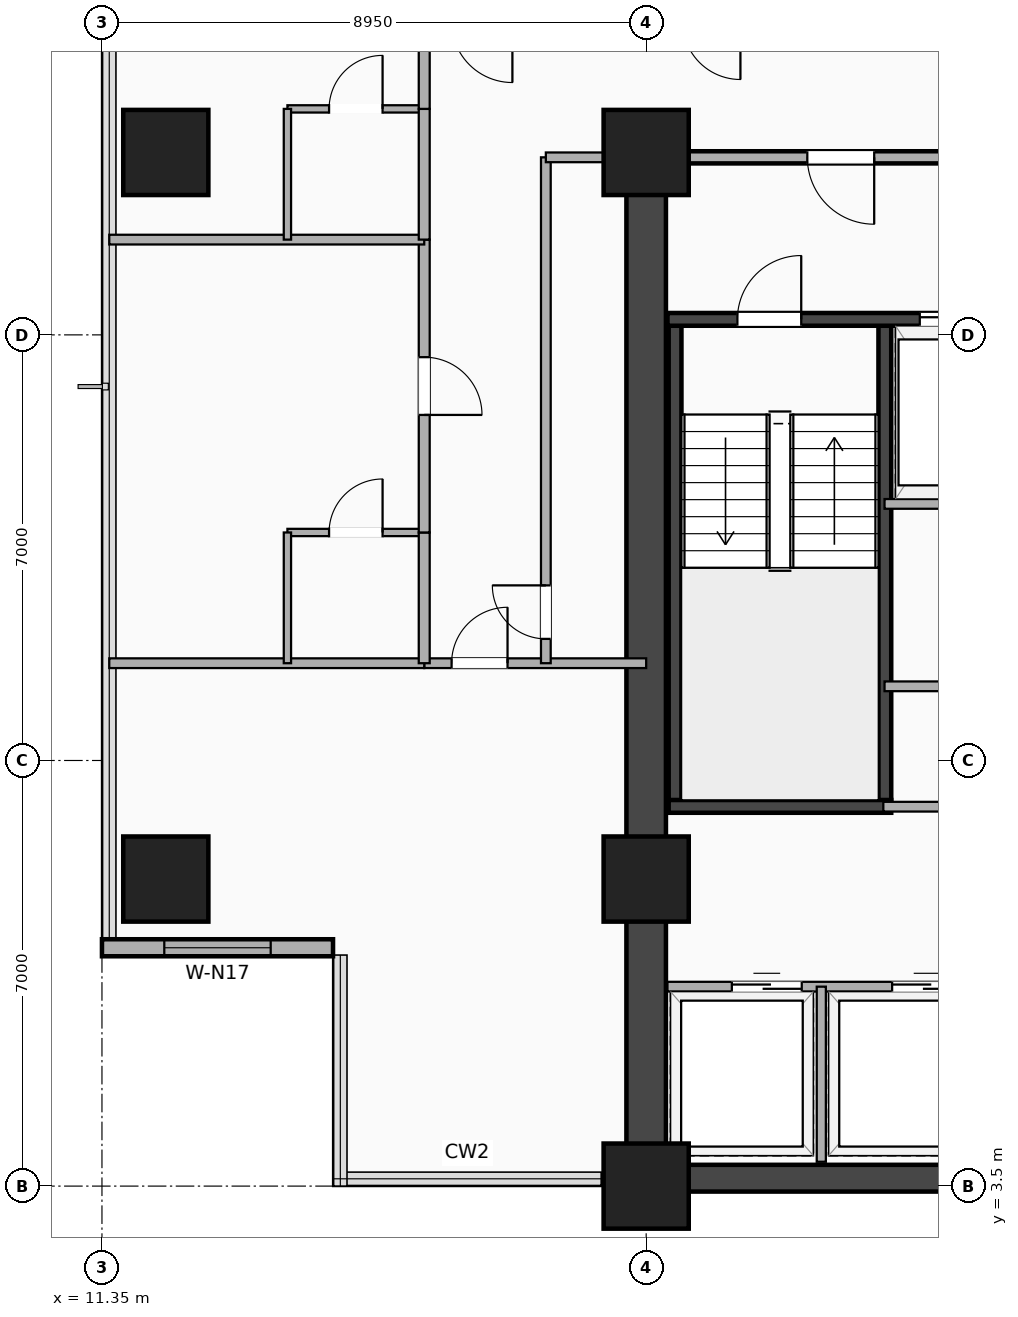
"""IFC4 building model, lengths in metres.
Left out: names, types, materials, properties, quantities, classifications, styles, units other than length and angle.
Written with IfcOpenShell. Run it as: python <this file> out.ifc"""

import sys

from ifc_helpers import new_model, si_unit, direction, frame, frame_2d, origin, origin_2d, place, context, subcontext, project, spatial, rectangle, extrude, element, fill, save


model = new_model("IFC4")
c1 = context("Model", 3, precision=1e-05, world=origin(), true_north=direction((0.0, 1.0)))
c2 = subcontext(c1, "Body", "Model", "MODEL_VIEW")
j1 = project(units=[si_unit("LENGTHUNIT", "METRE"), si_unit("PLANEANGLEUNIT", "RADIAN")], contexts=[c1])
p1 = place(None, origin())
s1 = spatial("IfcSite", under=j1, at=p1, CompositionType="ELEMENT")
p2 = place(p1, origin())
s2 = spatial("IfcBuilding", under=s1, at=p2, CompositionType="ELEMENT")
p3 = place(p2, frame((0.0, 0.0, 64.9)))
s3 = spatial("IfcBuildingStorey", under=s2, at=p3, CompositionType="ELEMENT", Elevation=64.9)
p4 = place(p3, frame((20.3, 3.63, 0.0), z_axis=(0.0, 0.0, 1.0), x_axis=(1.0, 0.0, 0.0)))
e1 = element("IfcWall", 1, at=p4, inside=s3, PredefinedType="SHEAR", context=c2, shape_type="SweptSolid", body=[
    extrude(rectangle(XDim=24.5, YDim=0.44, at=frame_2d((12.25, 0.0))), origin(), (0.0, 0.0, 1.0), 3.22),
])
p5 = place(p3, frame((20.3, 3.5, 0.0), z_axis=(0.0, 0.0, 1.0), x_axis=(0.0, 1.0, 0.0)))
e2 = element("IfcWall", 2, at=p5, inside=s3, PredefinedType="SHEAR", context=c2, shape_type="SweptSolid", body=[
    extrude(rectangle(XDim=16.9, YDim=0.65, at=frame_2d((8.45, 0.0))), origin(), (0.0, 0.0, 1.0), 3.22),
])
for number, where, z_axis, x_axis in (
    (3, (20.775, 9.745, 0.0), (0.0, 0.0, 1.0), (0.0, 1.0, 0.0)),
    (4, (24.225, 9.745, 0.0), (0.0, 0.0, 1.0), (0.0, 1.0, 0.0)),
):
    element("IfcWall", number, at=place(p3, frame(where, z_axis=z_axis, x_axis=x_axis)), inside=s3, PredefinedType="SHEAR", context=c2, shape_type="SweptSolid", body=[
        extrude(rectangle(XDim=8.01, YDim=0.21, at=frame_2d((4.005, 0.0))), origin(), (0.0, 0.0, 1.0), 3.22),
    ])
p6 = place(p3, frame((20.67, 9.745, 0.0), z_axis=(0.0, 0.0, 1.0), x_axis=(1.0, 0.0, 0.0)))
e5 = element("IfcWall", 5, at=p6, inside=s3, PredefinedType="SHEAR", context=c2, shape_type="SweptSolid", body=[
    extrude(rectangle(XDim=3.66, YDim=0.21, at=frame_2d((1.83, 0.0))), origin(), (0.0, 0.0, 1.0), 3.22),
])
p7 = place(p3, frame((20.65, 17.755, 0.0), z_axis=(0.0, 0.0, 1.0), x_axis=(1.0, 0.0, 0.0)))
e6 = element("IfcWall", 6, at=p7, inside=s3, PredefinedType="SHEAR", context=c2, shape_type="SweptSolid", body=[
    extrude(rectangle(XDim=8.3, YDim=0.21, at=frame_2d((4.15, 0.0))), origin(), (0.0, 0.0, 1.0), 3.22),
])
p8 = place(p7, frame((2.2, 0.0, 0.0), z_axis=(0.0, 0.0, 1.0), x_axis=(-1.0, 0.0, 0.0)))
e7 = element("IfcOpeningElement", 7, at=p8, cuts=e6, PredefinedType="OPENING", context=c2, shape_type="SweptSolid", body=[
    extrude(rectangle(XDim=1.05, YDim=2.15, at=frame_2d((0.525, 1.075))), frame((0.0, 0.115, 0.0), z_axis=(0.0, -1.0, 0.0), x_axis=(1.0, 0.0, 0.0)), (0.0, 0.0, 1.0), 0.23),
])
p9 = place(p7, frame((4.15, 0.0, 0.0)))
e8 = element("IfcOpeningElement", 8, at=p9, cuts=e6, PredefinedType="OPENING", context=c2, shape_type="SweptSolid", body=[
    extrude(rectangle(XDim=1.1, YDim=2.18, at=frame_2d((0.55, 1.09))), frame((0.0, 0.115, 0.0), z_axis=(0.0, -1.0, 0.0), x_axis=(1.0, 0.0, 0.0)), (0.0, 0.0, 1.0), 0.23),
])
p10 = place(p7, frame((6.45, 0.0, 0.0)))
e9 = element("IfcOpeningElement", 9, at=p10, cuts=e6, PredefinedType="OPENING", context=c2, shape_type="SweptSolid", body=[
    extrude(rectangle(XDim=1.12, YDim=2.2, at=frame_2d((0.56, 1.1))), frame((0.0, 0.115, 0.0), z_axis=(0.0, -1.0, 0.0), x_axis=(1.0, 0.0, 0.0)), (0.0, 0.0, 1.0), 0.23),
])
for number, where, z_axis, x_axis in (
    (10, (20.3, 3.5, -0.28), (0.0, 0.0, 1.0), (1.0, 0.0, 0.0)),
    (11, (20.3, 8.55, -0.28), (0.0, 0.0, 1.0), (1.0, 0.0, 0.0)),
    (12, (20.3, 20.5, -0.28), (0.0, 0.0, 1.0), (1.0, 0.0, 0.0)),
    (13, (12.4, 8.55, -0.28), (0.0, 0.0, 1.0), (1.0, 0.0, 0.0)),
    (14, (12.4, 20.5, -0.28), (0.0, 0.0, 1.0), (1.0, 0.0, 0.0)),
):
    element("IfcColumn", number, at=place(p3, frame(where, z_axis=z_axis, x_axis=x_axis)), inside=s3, PredefinedType="COLUMN", context=c2, shape_type="SweptSolid", body=[
        extrude(rectangle(XDim=1.4, YDim=1.4, at=origin_2d()), origin(), (0.0, 0.0, 1.0), 3.5),
    ])
p11 = place(p3, frame((11.35, 7.42, 0.0), z_axis=(0.0, 0.0, 1.0), x_axis=(1.0, 0.0, 0.0)))
e15 = element("IfcWall", 15, at=p11, inside=s3, PredefinedType="SOLIDWALL", context=c2, shape_type="SweptSolid", body=[
    extrude(rectangle(XDim=3.8, YDim=0.28, at=frame_2d((1.9, 0.0))), origin(), (0.0, 0.0, 1.0), 3.22),
])
p12 = place(p11, frame((1.025, 0.0, 0.85)))
e16 = element("IfcOpeningElement", 16, at=p12, cuts=e15, PredefinedType="OPENING", context=c2, shape_type="SweptSolid", body=[
    extrude(rectangle(XDim=1.75, YDim=1.65, at=frame_2d((0.875, 0.825))), frame((0.0, 0.15, 0.0), z_axis=(0.0, -1.0, 0.0), x_axis=(1.0, 0.0, 0.0)), (0.0, 0.0, 1.0), 0.3),
])
p13 = place(p3, frame((24.22, 14.72, 0.0), z_axis=(0.0, 0.0, 1.0), x_axis=(1.0, 0.0, 0.0)))
e17 = element("IfcWall", 17, at=p13, inside=s3, PredefinedType="PARTITIONING", context=c2, shape_type="SweptSolid", body=[
    extrude(rectangle(XDim=4.73, YDim=0.16, at=frame_2d((2.365, 0.0))), origin(), (0.0, 0.0, 1.0), 3.22),
])
p14 = place(p3, frame((20.65, 20.42, 0.0), z_axis=(0.0, 0.0, 1.0), x_axis=(1.0, 0.0, 0.0)))
e18 = element("IfcWall", 18, at=p14, inside=s3, PredefinedType="PARTITIONING", context=c2, shape_type="SweptSolid", body=[
    extrude(rectangle(XDim=5.73, YDim=0.2, at=frame_2d((2.865, 0.0))), origin(), (0.0, 0.0, 1.0), 2.51),
])
p15 = place(p14, frame((2.3, 0.0, 0.0)))
e19 = element("IfcOpeningElement", 19, at=p15, cuts=e18, PredefinedType="OPENING", context=c2, shape_type="SweptSolid", body=[
    extrude(rectangle(XDim=1.1, YDim=2.15, at=frame_2d((0.55, 1.075))), frame((0.0, 0.11, 0.0), z_axis=(0.0, -1.0, 0.0), x_axis=(1.0, 0.0, 0.0)), (0.0, 0.0, 1.0), 0.22),
])
p16 = place(p3, frame((24.22, 11.72, 0.0), z_axis=(0.0, 0.0, 1.0), x_axis=(1.0, 0.0, 0.0)))
e20 = element("IfcWall", 20, at=p16, inside=s3, PredefinedType="PARTITIONING", context=c2, shape_type="SweptSolid", body=[
    extrude(rectangle(XDim=4.73, YDim=0.16, at=frame_2d((2.365, 0.0))), origin(), (0.0, 0.0, 1.0), 3.22),
])
p17 = place(p16, frame((1.905, 0.0, 0.0)))
e21 = element("IfcOpeningElement", 21, at=p17, cuts=e20, PredefinedType="OPENING", context=c2, shape_type="SweptSolid", body=[
    extrude(rectangle(XDim=0.92, YDim=2.08, at=frame_2d((0.46, 1.04))), frame((0.0, 0.09, 0.0), z_axis=(0.0, -1.0, 0.0), x_axis=(1.0, 0.0, 0.0)), (0.0, 0.0, 1.0), 0.18),
])
p18 = place(p3, frame((20.65, 6.78, 0.0), z_axis=(0.0, 0.0, 1.0), x_axis=(1.0, 0.0, 0.0)))
e22 = element("IfcWall", 22, at=p18, inside=s3, PredefinedType="PARTITIONING", context=c2, shape_type="SweptSolid", body=[
    extrude(rectangle(XDim=8.3, YDim=0.16, at=frame_2d((4.15, 0.0))), origin(), (0.0, 0.0, 1.0), 2.51),
])
p19 = place(p18, frame((3.695, 0.0, 0.0)))
e23 = element("IfcOpeningElement", 23, at=p19, cuts=e22, PredefinedType="OPENING", context=c2, shape_type="SweptSolid", body=[
    extrude(rectangle(XDim=1.15, YDim=2.2, at=frame_2d((0.575, 1.1))), frame((0.0, 0.09, 0.0), z_axis=(0.0, -1.0, 0.0), x_axis=(1.0, 0.0, 0.0)), (0.0, 0.0, 1.0), 0.18),
])
p20 = place(p18, frame((5.492, 0.0, 0.0)))
e24 = element("IfcOpeningElement", 24, at=p20, cuts=e22, PredefinedType="OPENING", context=c2, shape_type="SweptSolid", body=[
    extrude(rectangle(XDim=1.15, YDim=2.2, at=frame_2d((0.575, 1.1))), frame((0.0, 0.09, 0.0), z_axis=(0.0, -1.0, 0.0), x_axis=(1.0, 0.0, 0.0)), (0.0, 0.0, 1.0), 0.18),
])
p21 = place(p18, frame((1.059, 0.0, 0.0)))
e25 = element("IfcOpeningElement", 25, at=p21, cuts=e22, PredefinedType="OPENING", context=c2, shape_type="SweptSolid", body=[
    extrude(rectangle(XDim=1.15, YDim=2.2, at=frame_2d((0.575, 1.1))), frame((0.0, 0.09, 0.0), z_axis=(0.0, -1.0, 0.0), x_axis=(1.0, 0.0, 0.0)), (0.0, 0.0, 1.0), 0.18),
])
p22 = place(p3, frame((23.18, 3.9, 0.0), z_axis=(0.0, 0.0, 1.0), x_axis=(0.0, 1.0, 0.0)))
e26 = element("IfcWall", 26, at=p22, inside=s3, PredefinedType="PARTITIONING", context=c2, shape_type="SweptSolid", body=[
    extrude(rectangle(XDim=2.88, YDim=0.15, at=frame_2d((1.44, 0.0))), origin(), (0.0, 0.0, 1.0), 3.22),
])
p23 = place(p3, frame((24.2, 9.74, 0.0), z_axis=(0.0, 0.0, 1.0), x_axis=(1.0, 0.0, 0.0)))
e27 = element("IfcWall", 27, at=p23, inside=s3, PredefinedType="PARTITIONING", context=c2, shape_type="SweptSolid", body=[
    extrude(rectangle(XDim=4.8, YDim=0.16, at=frame_2d((2.4, 0.0))), origin(), (0.0, 0.0, 1.0), 3.22),
])
p24 = place(p23, frame((1.85, 0.0, 0.0)))
e28 = element("IfcOpeningElement", 28, at=p24, cuts=e27, PredefinedType="OPENING", context=c2, shape_type="SweptSolid", body=[
    extrude(rectangle(XDim=1.1, YDim=2.15, at=frame_2d((0.55, 1.075))), frame((0.0, 0.09, 0.0), z_axis=(0.0, -1.0, 0.0), x_axis=(1.0, 0.0, 0.0)), (0.0, 0.0, 1.0), 0.18),
])
p25 = place(p3, frame((16.65, 12.1, 0.0), z_axis=(0.0, 0.0, 1.0), x_axis=(1.0, 0.0, 0.0)))
e29 = element("IfcWall", 29, at=p25, inside=s3, PredefinedType="PARTITIONING", context=c2, shape_type="SweptSolid", body=[
    extrude(rectangle(XDim=3.65, YDim=0.16, at=frame_2d((1.825, 0.0))), origin(), (0.0, 0.0, 1.0), 2.51),
])
p26 = place(p25, frame((1.37, 0.0, 0.0), z_axis=(0.0, 0.0, 1.0), x_axis=(-1.0, 0.0, 0.0)))
e30 = element("IfcOpeningElement", 30, at=p26, cuts=e29, PredefinedType="OPENING", context=c2, shape_type="SweptSolid", body=[
    extrude(rectangle(XDim=0.92, YDim=2.08, at=frame_2d((0.46, 1.04))), frame((0.0, 0.09, 0.0), z_axis=(0.0, -1.0, 0.0), x_axis=(1.0, 0.0, 0.0)), (0.0, 0.0, 1.0), 0.18),
])
p27 = place(p3, frame((18.65, 12.1, 0.0), z_axis=(0.0, 0.0, 1.0), x_axis=(0.0, 1.0, 0.0)))
e31 = element("IfcWall", 31, at=p27, inside=s3, PredefinedType="PARTITIONING", context=c2, shape_type="SweptSolid", body=[
    extrude(rectangle(XDim=8.32, YDim=0.16, at=frame_2d((4.16, 0.0))), origin(), (0.0, 0.0, 1.0), 2.51),
])
p28 = place(p27, frame((1.28, 0.0, 0.0), z_axis=(0.0, 0.0, 1.0), x_axis=(-1.0, 0.0, 0.0)))
e32 = element("IfcOpeningElement", 32, at=p28, cuts=e31, PredefinedType="OPENING", context=c2, shape_type="SweptSolid", body=[
    extrude(rectangle(XDim=0.88, YDim=2.08, at=frame_2d((0.44, 1.04))), frame((0.0, 0.09, 0.0), z_axis=(0.0, -1.0, 0.0), x_axis=(1.0, 0.0, 0.0)), (0.0, 0.0, 1.0), 0.18),
])
p29 = place(p3, frame((18.65, 20.42, 0.0), z_axis=(0.0, 0.0, 1.0), x_axis=(1.0, 0.0, 0.0)))
e33 = element("IfcWall", 33, at=p29, inside=s3, PredefinedType="PARTITIONING", context=c2, shape_type="SweptSolid", body=[
    extrude(rectangle(XDim=1.65, YDim=0.16, at=frame_2d((0.825, 0.0))), origin(), (0.0, 0.0, 1.0), 2.51),
])
p30 = place(p3, frame((11.47, 12.1, 0.0), z_axis=(0.0, 0.0, 1.0), x_axis=(1.0, 0.0, 0.0)))
e34 = element("IfcWall", 34, at=p30, inside=s3, PredefinedType="PARTITIONING", context=c2, shape_type="SweptSolid", body=[
    extrude(rectangle(XDim=5.18, YDim=0.16, at=frame_2d((2.59, 0.0))), origin(), (0.0, 0.0, 1.0), 2.583),
])
p31 = place(p3, frame((14.4, 14.25, 0.0), z_axis=(0.0, 0.0, 1.0), x_axis=(1.0, 0.0, 0.0)))
e35 = element("IfcWall", 35, at=p31, inside=s3, PredefinedType="PARTITIONING", context=c2, shape_type="SweptSolid", body=[
    extrude(rectangle(XDim=2.25, YDim=0.12, at=frame_2d((1.125, 0.0))), origin(), (0.0, 0.0, 1.0), 3.22),
])
p32 = place(p31, frame((1.565, 0.0, 0.0), z_axis=(0.0, 0.0, 1.0), x_axis=(-1.0, 0.0, 0.0)))
e36 = element("IfcOpeningElement", 36, at=p32, cuts=e35, PredefinedType="OPENING", context=c2, shape_type="SweptSolid", body=[
    extrude(rectangle(XDim=0.88, YDim=2.08, at=frame_2d((0.44, 1.04))), frame((0.0, 0.07, 0.0), z_axis=(0.0, -1.0, 0.0), x_axis=(1.0, 0.0, 0.0)), (0.0, 0.0, 1.0), 0.14),
])
p33 = place(p3, frame((14.4, 12.1, 0.0), z_axis=(0.0, 0.0, 1.0), x_axis=(0.0, 1.0, 0.0)))
e37 = element("IfcWall", 37, at=p33, inside=s3, PredefinedType="PARTITIONING", context=c2, shape_type="SweptSolid", body=[
    extrude(rectangle(XDim=2.15, YDim=0.12, at=frame_2d((1.075, 0.0))), origin(), (0.0, 0.0, 1.0), 2.902),
])
p34 = place(p3, frame((16.65, 12.1, 0.0), z_axis=(0.0, 0.0, 1.0), x_axis=(0.0, 1.0, 0.0)))
e38 = element("IfcWall", 38, at=p34, inside=s3, PredefinedType="PARTITIONING", context=c2, shape_type="SweptSolid", body=[
    extrude(rectangle(XDim=2.15, YDim=0.18, at=frame_2d((1.075, 0.0))), origin(), (0.0, 0.0, 1.0), 2.902),
])
p35 = place(p3, frame((16.65, 14.25, 0.0), z_axis=(0.0, 0.0, 1.0), x_axis=(0.0, 1.0, 0.0)))
e39 = element("IfcWall", 39, at=p35, inside=s3, PredefinedType="PARTITIONING", context=c2, shape_type="SweptSolid", body=[
    extrude(rectangle(XDim=4.817, YDim=0.18, at=frame_2d((2.408, 0.0))), origin(), (0.0, 0.0, 1.0), 2.902),
])
p36 = place(p35, frame((1.933, 0.0, 0.0)))
e40 = element("IfcOpeningElement", 40, at=p36, cuts=e39, PredefinedType="OPENING", context=c2, shape_type="SweptSolid", body=[
    extrude(rectangle(XDim=0.95, YDim=2.15, at=frame_2d((0.475, 1.075))), frame((0.0, 0.1, 0.0), z_axis=(0.0, -1.0, 0.0), x_axis=(1.0, 0.0, 0.0)), (0.0, 0.0, 1.0), 0.2),
])
p37 = place(p3, frame((11.47, 19.067, 0.0), z_axis=(0.0, 0.0, 1.0), x_axis=(1.0, 0.0, 0.0)))
e41 = element("IfcWall", 41, at=p37, inside=s3, PredefinedType="PARTITIONING", context=c2, shape_type="SweptSolid", body=[
    extrude(rectangle(XDim=5.18, YDim=0.16, at=frame_2d((2.59, 0.0))), origin(), (0.0, 0.0, 1.0), 2.583),
])
p38 = place(p3, frame((14.4, 21.217, 0.0), z_axis=(0.0, 0.0, 1.0), x_axis=(1.0, 0.0, 0.0)))
e42 = element("IfcWall", 42, at=p38, inside=s3, PredefinedType="PARTITIONING", context=c2, shape_type="SweptSolid", body=[
    extrude(rectangle(XDim=2.25, YDim=0.12, at=frame_2d((1.125, 0.0))), origin(), (0.0, 0.0, 1.0), 3.22),
])
p39 = place(p38, frame((1.565, 0.0, 0.0), z_axis=(0.0, 0.0, 1.0), x_axis=(-1.0, 0.0, 0.0)))
e43 = element("IfcOpeningElement", 43, at=p39, cuts=e42, PredefinedType="OPENING", context=c2, shape_type="SweptSolid", body=[
    extrude(rectangle(XDim=0.88, YDim=2.08, at=frame_2d((0.44, 1.04))), frame((0.0, 0.07, 0.0), z_axis=(0.0, -1.0, 0.0), x_axis=(1.0, 0.0, 0.0)), (0.0, 0.0, 1.0), 0.14),
])
p40 = place(p3, frame((14.4, 19.067, 0.0), z_axis=(0.0, 0.0, 1.0), x_axis=(0.0, 1.0, 0.0)))
e44 = element("IfcWall", 44, at=p40, inside=s3, PredefinedType="PARTITIONING", context=c2, shape_type="SweptSolid", body=[
    extrude(rectangle(XDim=2.15, YDim=0.12, at=frame_2d((1.075, 0.0))), origin(), (0.0, 0.0, 1.0), 2.51),
])
p41 = place(p3, frame((16.65, 19.067, 0.0), z_axis=(0.0, 0.0, 1.0), x_axis=(0.0, 1.0, 0.0)))
e45 = element("IfcWall", 45, at=p41, inside=s3, PredefinedType="PARTITIONING", context=c2, shape_type="SweptSolid", body=[
    extrude(rectangle(XDim=2.15, YDim=0.18, at=frame_2d((1.075, 0.0))), origin(), (0.0, 0.0, 1.0), 2.51),
])
p42 = place(p3, frame((16.65, 21.217, 0.0), z_axis=(0.0, 0.0, 1.0), x_axis=(0.0, 1.0, 0.0)))
e46 = element("IfcWall", 46, at=p42, inside=s3, PredefinedType="PARTITIONING", context=c2, shape_type="SweptSolid", body=[
    extrude(rectangle(XDim=4.816, YDim=0.18, at=frame_2d((2.408, 0.0))), origin(), (0.0, 0.0, 1.0), 2.788),
])
p43 = place(p42, frame((1.933, 0.0, 0.0)))
e47 = element("IfcOpeningElement", 47, at=p43, cuts=e46, PredefinedType="OPENING", context=c2, shape_type="SweptSolid", body=[
    extrude(rectangle(XDim=0.95, YDim=2.15, at=frame_2d((0.475, 1.075))), frame((0.0, 0.1, 0.0), z_axis=(0.0, -1.0, 0.0), x_axis=(1.0, 0.0, 0.0)), (0.0, 0.0, 1.0), 0.2),
])
p44 = place(p12, origin())
e48 = element("IfcWindow", 48, at=p44, inside=s3, PartitioningType="SINGLE_PANEL", PredefinedType="WINDOW", context=c2, shape_type="SweptSolid", body=[
    extrude(rectangle(XDim=1.75, YDim=1.65, at=frame_2d((0.875, 0.825))), frame((0.0, 0.03, 0.0), z_axis=(0.0, -1.0, 0.0), x_axis=(1.0, 0.0, 0.0)), (0.0, 0.0, 1.0), 0.06),
])
fill(e16, e48)
p45 = place(p8, origin())
e49 = element("IfcDoor", 49, at=p45, inside=s3, OperationType="SINGLE_SWING_RIGHT", PredefinedType="DOOR", context=c2, shape_type="SweptSolid", body=[
    extrude(rectangle(XDim=1.05, YDim=2.15, at=frame_2d((0.525, 1.075))), frame((0.0, 0.025, 0.0), z_axis=(0.0, -1.0, 0.0), x_axis=(1.0, 0.0, 0.0)), (0.0, 0.0, 1.0), 0.05),
])
fill(e7, e49)
p46 = place(p9, origin())
e50 = element("IfcDoor", 50, at=p46, inside=s3, OperationType="DOUBLE_DOOR_SLIDING", PredefinedType="DOOR", context=c2, shape_type="SweptSolid", body=[
    extrude(rectangle(XDim=1.1, YDim=2.18, at=frame_2d((0.55, 1.09))), frame((0.0, 0.025, 0.0), z_axis=(0.0, -1.0, 0.0), x_axis=(1.0, 0.0, 0.0)), (0.0, 0.0, 1.0), 0.05),
])
fill(e8, e50)
p47 = place(p15, origin())
e51 = element("IfcDoor", 51, at=p47, inside=s3, OperationType="SINGLE_SWING_RIGHT", PredefinedType="DOOR", context=c2, shape_type="SweptSolid", body=[
    extrude(rectangle(XDim=1.1, YDim=2.15, at=frame_2d((0.55, 1.075))), frame((0.0, 0.025, 0.0), z_axis=(0.0, -1.0, 0.0), x_axis=(1.0, 0.0, 0.0)), (0.0, 0.0, 1.0), 0.05),
])
fill(e19, e51)
p48 = place(p19, origin())
e52 = element("IfcDoor", 52, at=p48, inside=s3, OperationType="DOUBLE_DOOR_SLIDING", PredefinedType="DOOR", context=c2, shape_type="SweptSolid", body=[
    extrude(rectangle(XDim=1.15, YDim=2.2, at=frame_2d((0.575, 1.1))), frame((0.0, 0.025, 0.0), z_axis=(0.0, -1.0, 0.0), x_axis=(1.0, 0.0, 0.0)), (0.0, 0.0, 1.0), 0.05),
])
fill(e23, e52)
p49 = place(p21, origin())
e53 = element("IfcDoor", 53, at=p49, inside=s3, OperationType="DOUBLE_DOOR_SLIDING", PredefinedType="DOOR", context=c2, shape_type="SweptSolid", body=[
    extrude(rectangle(XDim=1.15, YDim=2.2, at=frame_2d((0.575, 1.1))), frame((0.0, 0.025, 0.0), z_axis=(0.0, -1.0, 0.0), x_axis=(1.0, 0.0, 0.0)), (0.0, 0.0, 1.0), 0.05),
])
fill(e25, e53)
p50 = place(p26, origin())
e54 = element("IfcDoor", 54, at=p50, inside=s3, OperationType="SINGLE_SWING_RIGHT", PredefinedType="DOOR", context=c2, shape_type="SweptSolid", body=[
    extrude(rectangle(XDim=0.92, YDim=2.08, at=frame_2d((0.46, 1.04))), frame((0.0, 0.025, 0.0), z_axis=(0.0, -1.0, 0.0), x_axis=(1.0, 0.0, 0.0)), (0.0, 0.0, 1.0), 0.05),
])
fill(e30, e54)
p51 = place(p28, origin())
e55 = element("IfcDoor", 55, at=p51, inside=s3, OperationType="SINGLE_SWING_RIGHT", PredefinedType="DOOR", context=c2, shape_type="SweptSolid", body=[
    extrude(rectangle(XDim=0.88, YDim=2.08, at=frame_2d((0.44, 1.04))), frame((0.0, 0.025, 0.0), z_axis=(0.0, -1.0, 0.0), x_axis=(1.0, 0.0, 0.0)), (0.0, 0.0, 1.0), 0.05),
])
fill(e32, e55)
p52 = place(p32, origin())
e56 = element("IfcDoor", 56, at=p52, inside=s3, OperationType="SINGLE_SWING_RIGHT", PredefinedType="DOOR", context=c2, shape_type="SweptSolid", body=[
    extrude(rectangle(XDim=0.88, YDim=2.08, at=frame_2d((0.44, 1.04))), frame((0.0, 0.025, 0.0), z_axis=(0.0, -1.0, 0.0), x_axis=(1.0, 0.0, 0.0)), (0.0, 0.0, 1.0), 0.05),
])
fill(e36, e56)
p53 = place(p36, origin())
e57 = element("IfcDoor", 57, at=p53, inside=s3, OperationType="SINGLE_SWING_LEFT", PredefinedType="DOOR", context=c2, shape_type="SweptSolid", body=[
    extrude(rectangle(XDim=0.95, YDim=2.15, at=frame_2d((0.475, 1.075))), frame((0.0, 0.025, 0.0), z_axis=(0.0, -1.0, 0.0), x_axis=(1.0, 0.0, 0.0)), (0.0, 0.0, 1.0), 0.05),
])
fill(e40, e57)
p54 = place(p39, origin())
e58 = element("IfcDoor", 58, at=p54, inside=s3, OperationType="SINGLE_SWING_RIGHT", PredefinedType="DOOR", context=c2, shape_type="SweptSolid", body=[
    extrude(rectangle(XDim=0.88, YDim=2.08, at=frame_2d((0.44, 1.04))), frame((0.0, 0.025, 0.0), z_axis=(0.0, -1.0, 0.0), x_axis=(1.0, 0.0, 0.0)), (0.0, 0.0, 1.0), 0.05),
])
fill(e43, e58)
save(model, sys.argv[1])
